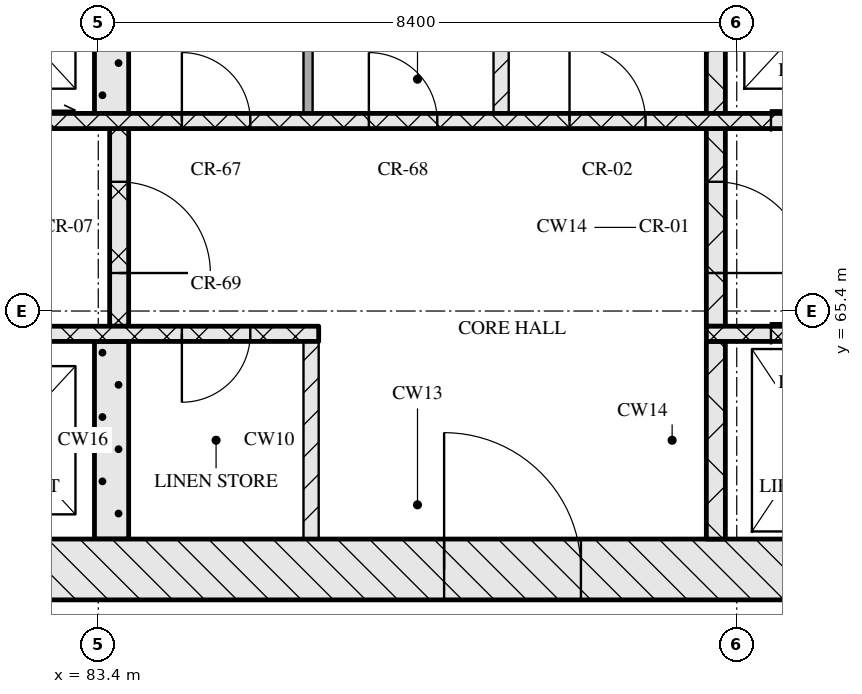
"""IFC4 building model, lengths in metres.
Left out: names, types, materials, properties, quantities, classifications, styles, units other than length and angle.
Written with IfcOpenShell. Run it as: python <this file> out.ifc"""

import sys

from ifc_helpers import new_model, si_unit, direction, frame, frame_2d, origin, place, context, subcontext, project, spatial, rectangle, extrude, element, fill, save


model = new_model("IFC4")
c1 = context("Model", 3, precision=1e-05, world=origin(), true_north=direction((0.0, 1.0)))
c2 = subcontext(c1, "Body", "Model", "MODEL_VIEW")
j1 = project(units=[si_unit("LENGTHUNIT", "METRE"), si_unit("PLANEANGLEUNIT", "RADIAN")], contexts=[c1])
p1 = place(None, origin())
s1 = spatial("IfcSite", under=j1, at=p1, CompositionType="ELEMENT")
p2 = place(p1, origin())
s2 = spatial("IfcBuilding", under=s1, at=p2, CompositionType="ELEMENT")
p3 = place(p2, frame((0.0, 0.0, 142.05)))
s3 = spatial("IfcBuildingStorey", under=s2, at=p3, CompositionType="ELEMENT", Elevation=142.05)
p4 = place(p3, frame((67.0, 62.0, 0.0), z_axis=(0.0, 0.0, 1.0), x_axis=(1.0, 0.0, 0.0)))
e1 = element("IfcWall", 1, at=p4, inside=s3, PredefinedType="SOLIDWALL", context=c2, shape_type="SweptSolid", body=[
    extrude(rectangle(XDim=41.2, YDim=0.8, at=frame_2d((20.6, 0.0))), origin(), (0.0, 0.0, 1.0), 5.12),
])
p5 = place(p4, frame((20.95, 0.0, 0.0)))
e2 = element("IfcOpeningElement", 2, at=p5, cuts=e1, PredefinedType="OPENING", context=c2, shape_type="SweptSolid", body=[
    extrude(rectangle(XDim=1.8, YDim=2.1, at=frame_2d((0.9, 1.05))), frame((0.0, 0.41, 0.0), z_axis=(0.0, -1.0, 0.0), x_axis=(1.0, 0.0, 0.0)), (0.0, 0.0, 1.0), 0.82),
])
p6 = place(p3, frame((83.575, 62.4, 0.0), z_axis=(0.0, 0.0, 1.0), x_axis=(0.0, 1.0, 0.0)))
e3 = element("IfcWall", 3, at=p6, inside=s3, PredefinedType="SOLIDWALL", context=c2, shape_type="SweptSolid", body=[
    extrude(rectangle(XDim=2.6, YDim=0.45, at=frame_2d((1.3, 0.0))), origin(), (0.0, 0.0, 1.0), 5.12),
])
p7 = place(p3, frame((86.2, 62.4, 0.0), z_axis=(0.0, 0.0, 1.0), x_axis=(0.0, 1.0, 0.0)))
e4 = element("IfcWall", 4, at=p7, inside=s3, PredefinedType="PARTITIONING", context=c2, shape_type="SweptSolid", body=[
    extrude(rectangle(XDim=2.6, YDim=0.2, at=frame_2d((1.3, 0.0))), origin(), (0.0, 0.0, 1.0), 5.12),
])
p8 = place(p3, frame((91.525, 62.4, 0.0), z_axis=(0.0, 0.0, 1.0), x_axis=(0.0, 1.0, 0.0)))
e5 = element("IfcWall", 5, at=p8, inside=s3, PredefinedType="SOLIDWALL", context=c2, shape_type="SweptSolid", body=[
    extrude(rectangle(XDim=2.6, YDim=0.25, at=frame_2d((1.3, 0.0))), origin(), (0.0, 0.0, 1.0), 5.12),
])
p9 = place(p3, frame((67.8, 65.1, 0.0), z_axis=(0.0, 0.0, 1.0), x_axis=(1.0, 0.0, 0.0)))
e6 = element("IfcWall", 6, at=p9, inside=s3, PredefinedType="SOLIDWALL", context=c2, shape_type="SweptSolid", body=[
    extrude(rectangle(XDim=18.5, YDim=0.2, at=frame_2d((9.25, 0.0))), origin(), (0.0, 0.0, 1.0), 5.12),
])
p10 = place(p9, frame((7.27, 0.0, 0.0)))
e7 = element("IfcOpeningElement", 7, at=p10, cuts=e6, PredefinedType="OPENING", context=c2, shape_type="SweptSolid", body=[
    extrude(rectangle(XDim=0.9, YDim=2.1, at=frame_2d((0.45, 1.05))), frame((0.0, 0.11, 0.0), z_axis=(0.0, -1.0, 0.0), x_axis=(1.0, 0.0, 0.0)), (0.0, 0.0, 1.0), 0.22),
])
p11 = place(p9, frame((8.85, 0.0, 0.0)))
e8 = element("IfcOpeningElement", 8, at=p11, cuts=e6, PredefinedType="OPENING", context=c2, shape_type="SweptSolid", body=[
    extrude(rectangle(XDim=1.1, YDim=2.1, at=frame_2d((0.55, 1.05))), frame((0.0, 0.11, 0.0), z_axis=(0.0, -1.0, 0.0), x_axis=(1.0, 0.0, 0.0)), (0.0, 0.0, 1.0), 0.22),
])
p12 = place(p9, frame((11.35, 0.0, 0.0)))
e9 = element("IfcOpeningElement", 9, at=p12, cuts=e6, PredefinedType="OPENING", context=c2, shape_type="SweptSolid", body=[
    extrude(rectangle(XDim=1.1, YDim=2.1, at=frame_2d((0.55, 1.05))), frame((0.0, 0.11, 0.0), z_axis=(0.0, -1.0, 0.0), x_axis=(1.0, 0.0, 0.0)), (0.0, 0.0, 1.0), 0.22),
])
p13 = place(p9, frame((13.85, 0.0, 0.0)))
e10 = element("IfcOpeningElement", 10, at=p13, cuts=e6, PredefinedType="OPENING", context=c2, shape_type="SweptSolid", body=[
    extrude(rectangle(XDim=1.1, YDim=2.1, at=frame_2d((0.55, 1.05))), frame((0.0, 0.11, 0.0), z_axis=(0.0, -1.0, 0.0), x_axis=(1.0, 0.0, 0.0)), (0.0, 0.0, 1.0), 0.22),
])
p14 = place(p9, frame((16.7, 0.0, 0.0)))
e11 = element("IfcOpeningElement", 11, at=p14, cuts=e6, PredefinedType="OPENING", context=c2, shape_type="SweptSolid", body=[
    extrude(rectangle(XDim=0.9, YDim=2.1, at=frame_2d((0.45, 1.05))), frame((0.0, 0.11, 0.0), z_axis=(0.0, -1.0, 0.0), x_axis=(1.0, 0.0, 0.0)), (0.0, 0.0, 1.0), 0.22),
])
p15 = place(p3, frame((91.4, 65.1, 0.0), z_axis=(0.0, 0.0, 1.0), x_axis=(1.0, 0.0, 0.0)))
e12 = element("IfcWall", 12, at=p15, inside=s3, PredefinedType="SOLIDWALL", context=c2, shape_type="SweptSolid", body=[
    extrude(rectangle(XDim=16.0, YDim=0.2, at=frame_2d((8.0, 0.0))), origin(), (0.0, 0.0, 1.0), 5.12),
])
p16 = place(p15, frame((0.85, 0.0, 0.0)))
e13 = element("IfcOpeningElement", 13, at=p16, cuts=e12, PredefinedType="OPENING", context=c2, shape_type="SweptSolid", body=[
    extrude(rectangle(XDim=1.1, YDim=2.1, at=frame_2d((0.55, 1.05))), frame((0.0, 0.11, 0.0), z_axis=(0.0, -1.0, 0.0), x_axis=(1.0, 0.0, 0.0)), (0.0, 0.0, 1.0), 0.22),
])
p17 = place(p15, frame((3.35, 0.0, 0.0)))
e14 = element("IfcOpeningElement", 14, at=p17, cuts=e12, PredefinedType="OPENING", context=c2, shape_type="SweptSolid", body=[
    extrude(rectangle(XDim=1.1, YDim=2.1, at=frame_2d((0.55, 1.05))), frame((0.0, 0.11, 0.0), z_axis=(0.0, -1.0, 0.0), x_axis=(1.0, 0.0, 0.0)), (0.0, 0.0, 1.0), 0.22),
])
p18 = place(p15, frame((5.85, 0.0, 0.0)))
e15 = element("IfcOpeningElement", 15, at=p18, cuts=e12, PredefinedType="OPENING", context=c2, shape_type="SweptSolid", body=[
    extrude(rectangle(XDim=1.1, YDim=2.1, at=frame_2d((0.55, 1.05))), frame((0.0, 0.11, 0.0), z_axis=(0.0, -1.0, 0.0), x_axis=(1.0, 0.0, 0.0)), (0.0, 0.0, 1.0), 0.22),
])
p19 = place(p15, frame((7.83, 0.0, 0.0)))
e16 = element("IfcOpeningElement", 16, at=p19, cuts=e12, PredefinedType="OPENING", context=c2, shape_type="SweptSolid", body=[
    extrude(rectangle(XDim=0.9, YDim=2.1, at=frame_2d((0.45, 1.05))), frame((0.0, 0.11, 0.0), z_axis=(0.0, -1.0, 0.0), x_axis=(1.0, 0.0, 0.0)), (0.0, 0.0, 1.0), 0.22),
])
p20 = place(p3, frame((83.675, 65.2, 0.0), z_axis=(0.0, 0.0, 1.0), x_axis=(0.0, 1.0, 0.0)))
e17 = element("IfcWall", 17, at=p20, inside=s3, PredefinedType="SOLIDWALL", context=c2, shape_type="SweptSolid", body=[
    extrude(rectangle(XDim=2.6, YDim=0.25, at=frame_2d((1.3, 0.0))), origin(), (0.0, 0.0, 1.0), 5.12),
])
p21 = place(p20, frame((0.7, 0.0, 0.0)))
e18 = element("IfcOpeningElement", 18, at=p21, cuts=e17, PredefinedType="OPENING", context=c2, shape_type="SweptSolid", body=[
    extrude(rectangle(XDim=1.2, YDim=2.1, at=frame_2d((0.6, 1.05))), frame((0.0, 0.135, 0.0), z_axis=(0.0, -1.0, 0.0), x_axis=(1.0, 0.0, 0.0)), (0.0, 0.0, 1.0), 0.27),
])
p22 = place(p3, frame((91.525, 65.2, 0.0), z_axis=(0.0, 0.0, 1.0), x_axis=(0.0, 1.0, 0.0)))
e19 = element("IfcWall", 19, at=p22, inside=s3, PredefinedType="SOLIDWALL", context=c2, shape_type="SweptSolid", body=[
    extrude(rectangle(XDim=2.6, YDim=0.25, at=frame_2d((1.3, 0.0))), origin(), (0.0, 0.0, 1.0), 5.12),
])
p23 = place(p22, frame((0.7, 0.0, 0.0)))
e20 = element("IfcOpeningElement", 20, at=p23, cuts=e19, PredefinedType="OPENING", context=c2, shape_type="SweptSolid", body=[
    extrude(rectangle(XDim=1.2, YDim=2.1, at=frame_2d((0.6, 1.05))), frame((0.0, 0.135, 0.0), z_axis=(0.0, -1.0, 0.0), x_axis=(1.0, 0.0, 0.0)), (0.0, 0.0, 1.0), 0.27),
])
p24 = place(p3, frame((76.05, 67.9, 0.0), z_axis=(0.0, 0.0, 1.0), x_axis=(1.0, 0.0, 0.0)))
e21 = element("IfcWall", 21, at=p24, inside=s3, PredefinedType="SOLIDWALL", context=c2, shape_type="SweptSolid", body=[
    extrude(rectangle(XDim=23.1, YDim=0.2, at=frame_2d((11.55, 0.0))), origin(), (0.0, 0.0, 1.0), 5.12),
])
p25 = place(p24, frame((0.6, 0.0, 0.0)))
e22 = element("IfcOpeningElement", 22, at=p25, cuts=e21, PredefinedType="OPENING", context=c2, shape_type="SweptSolid", body=[
    extrude(rectangle(XDim=1.1, YDim=2.1, at=frame_2d((0.55, 1.05))), frame((0.0, 0.11, 0.0), z_axis=(0.0, -1.0, 0.0), x_axis=(1.0, 0.0, 0.0)), (0.0, 0.0, 1.0), 0.22),
])
p26 = place(p24, frame((3.1, 0.0, 0.0)))
e23 = element("IfcOpeningElement", 23, at=p26, cuts=e21, PredefinedType="OPENING", context=c2, shape_type="SweptSolid", body=[
    extrude(rectangle(XDim=1.1, YDim=2.1, at=frame_2d((0.55, 1.05))), frame((0.0, 0.11, 0.0), z_axis=(0.0, -1.0, 0.0), x_axis=(1.0, 0.0, 0.0)), (0.0, 0.0, 1.0), 0.22),
])
p27 = place(p24, frame((5.6, 0.0, 0.0)))
e24 = element("IfcOpeningElement", 24, at=p27, cuts=e21, PredefinedType="OPENING", context=c2, shape_type="SweptSolid", body=[
    extrude(rectangle(XDim=1.1, YDim=2.1, at=frame_2d((0.55, 1.05))), frame((0.0, 0.11, 0.0), z_axis=(0.0, -1.0, 0.0), x_axis=(1.0, 0.0, 0.0)), (0.0, 0.0, 1.0), 0.22),
])
p28 = place(p24, frame((8.45, 0.0, 0.0)))
e25 = element("IfcOpeningElement", 25, at=p28, cuts=e21, PredefinedType="OPENING", context=c2, shape_type="SweptSolid", body=[
    extrude(rectangle(XDim=0.9, YDim=2.1, at=frame_2d((0.45, 1.05))), frame((0.0, 0.11, 0.0), z_axis=(0.0, -1.0, 0.0), x_axis=(1.0, 0.0, 0.0)), (0.0, 0.0, 1.0), 0.22),
])
p29 = place(p24, frame((10.91, 0.0, 0.0)))
e26 = element("IfcOpeningElement", 26, at=p29, cuts=e21, PredefinedType="OPENING", context=c2, shape_type="SweptSolid", body=[
    extrude(rectangle(XDim=0.9, YDim=2.1, at=frame_2d((0.45, 1.05))), frame((0.0, 0.11, 0.0), z_axis=(0.0, -1.0, 0.0), x_axis=(1.0, 0.0, 0.0)), (0.0, 0.0, 1.0), 0.22),
])
p30 = place(p24, frame((13.55, 0.0, 0.0)))
e27 = element("IfcOpeningElement", 27, at=p30, cuts=e21, PredefinedType="OPENING", context=c2, shape_type="SweptSolid", body=[
    extrude(rectangle(XDim=1.0, YDim=2.1, at=frame_2d((0.5, 1.05))), frame((0.0, 0.11, 0.0), z_axis=(0.0, -1.0, 0.0), x_axis=(1.0, 0.0, 0.0)), (0.0, 0.0, 1.0), 0.22),
])
p31 = place(p24, frame((16.2, 0.0, 0.0)))
e28 = element("IfcOpeningElement", 28, at=p31, cuts=e21, PredefinedType="OPENING", context=c2, shape_type="SweptSolid", body=[
    extrude(rectangle(XDim=1.1, YDim=2.1, at=frame_2d((0.55, 1.05))), frame((0.0, 0.11, 0.0), z_axis=(0.0, -1.0, 0.0), x_axis=(1.0, 0.0, 0.0)), (0.0, 0.0, 1.0), 0.22),
])
p32 = place(p24, frame((18.7, 0.0, 0.0)))
e29 = element("IfcOpeningElement", 29, at=p32, cuts=e21, PredefinedType="OPENING", context=c2, shape_type="SweptSolid", body=[
    extrude(rectangle(XDim=1.1, YDim=2.1, at=frame_2d((0.55, 1.05))), frame((0.0, 0.11, 0.0), z_axis=(0.0, -1.0, 0.0), x_axis=(1.0, 0.0, 0.0)), (0.0, 0.0, 1.0), 0.22),
])
p33 = place(p24, frame((21.2, 0.0, 0.0)))
e30 = element("IfcOpeningElement", 30, at=p33, cuts=e21, PredefinedType="OPENING", context=c2, shape_type="SweptSolid", body=[
    extrude(rectangle(XDim=1.1, YDim=2.1, at=frame_2d((0.55, 1.05))), frame((0.0, 0.11, 0.0), z_axis=(0.0, -1.0, 0.0), x_axis=(1.0, 0.0, 0.0)), (0.0, 0.0, 1.0), 0.22),
])
p34 = place(p3, frame((83.575, 68.0, 0.0), z_axis=(0.0, 0.0, 1.0), x_axis=(0.0, 1.0, 0.0)))
e31 = element("IfcWall", 31, at=p34, inside=s3, PredefinedType="SOLIDWALL", context=c2, shape_type="SweptSolid", body=[
    extrude(rectangle(XDim=2.6, YDim=0.45, at=frame_2d((1.3, 0.0))), origin(), (0.0, 0.0, 1.0), 5.12),
])
p35 = place(p3, frame((86.16, 68.0, 0.0), z_axis=(0.0, 0.0, 1.0), x_axis=(0.0, 1.0, 0.0)))
e32 = element("IfcWall", 32, at=p35, inside=s3, PredefinedType="PARTITIONING", context=c2, shape_type="SweptSolid", body=[
    extrude(rectangle(XDim=2.6, YDim=0.12, at=frame_2d((1.3, 0.0))), origin(), (0.0, 0.0, 1.0), 5.12),
])
p36 = place(p3, frame((88.7, 68.0, 0.0), z_axis=(0.0, 0.0, 1.0), x_axis=(0.0, 1.0, 0.0)))
e33 = element("IfcWall", 33, at=p36, inside=s3, PredefinedType="PARTITIONING", context=c2, shape_type="SweptSolid", body=[
    extrude(rectangle(XDim=2.6, YDim=0.2, at=frame_2d((1.3, 0.0))), origin(), (0.0, 0.0, 1.0), 5.12),
])
p37 = place(p3, frame((91.525, 68.0, 0.0), z_axis=(0.0, 0.0, 1.0), x_axis=(0.0, 1.0, 0.0)))
e34 = element("IfcWall", 34, at=p37, inside=s3, PredefinedType="SOLIDWALL", context=c2, shape_type="SweptSolid", body=[
    extrude(rectangle(XDim=2.6, YDim=0.25, at=frame_2d((1.3, 0.0))), origin(), (0.0, 0.0, 1.0), 5.12),
])
p38 = place(p5, origin())
e35 = element("IfcDoor", 35, at=p38, inside=s3, OperationType="DOUBLE_DOOR_SINGLE_SWING", PredefinedType="DOOR", context=c2, shape_type="SweptSolid", body=[
    extrude(rectangle(XDim=1.8, YDim=2.1, at=frame_2d((0.9, 1.05))), frame((0.0, 0.025, 0.0), z_axis=(0.0, -1.0, 0.0), x_axis=(1.0, 0.0, 0.0)), (0.0, 0.0, 1.0), 0.05),
])
fill(e2, e35)
p39 = place(p14, origin())
e36 = element("IfcDoor", 36, at=p39, inside=s3, OperationType="SINGLE_SWING_RIGHT", PredefinedType="DOOR", context=c2, shape_type="SweptSolid", body=[
    extrude(rectangle(XDim=0.9, YDim=2.1, at=frame_2d((0.45, 1.05))), frame((0.0, 0.025, 0.0), z_axis=(0.0, -1.0, 0.0), x_axis=(1.0, 0.0, 0.0)), (0.0, 0.0, 1.0), 0.05),
])
fill(e11, e36)
p40 = place(p16, origin())
e37 = element("IfcDoor", 37, at=p40, inside=s3, OperationType="SLIDING_TO_LEFT", PredefinedType="DOOR", context=c2, shape_type="SweptSolid", body=[
    extrude(rectangle(XDim=1.1, YDim=2.1, at=frame_2d((0.55, 1.05))), frame((0.0, 0.025, 0.0), z_axis=(0.0, -1.0, 0.0), x_axis=(1.0, 0.0, 0.0)), (0.0, 0.0, 1.0), 0.05),
])
fill(e13, e37)
p41 = place(p21, origin())
e38 = element("IfcDoor", 38, at=p41, inside=s3, OperationType="SINGLE_SWING_RIGHT", PredefinedType="DOOR", context=c2, shape_type="SweptSolid", body=[
    extrude(rectangle(XDim=1.2, YDim=2.1, at=frame_2d((0.6, 1.05))), frame((0.0, 0.025, 0.0), z_axis=(0.0, -1.0, 0.0), x_axis=(1.0, 0.0, 0.0)), (0.0, 0.0, 1.0), 0.05),
])
fill(e18, e38)
p42 = place(p23, origin())
e39 = element("IfcDoor", 39, at=p42, inside=s3, OperationType="SINGLE_SWING_RIGHT", PredefinedType="DOOR", context=c2, shape_type="SweptSolid", body=[
    extrude(rectangle(XDim=1.2, YDim=2.1, at=frame_2d((0.6, 1.05))), frame((0.0, 0.025, 0.0), z_axis=(0.0, -1.0, 0.0), x_axis=(1.0, 0.0, 0.0)), (0.0, 0.0, 1.0), 0.05),
])
fill(e20, e39)
p43 = place(p28, origin())
e40 = element("IfcDoor", 40, at=p43, inside=s3, OperationType="SINGLE_SWING_LEFT", PredefinedType="DOOR", context=c2, shape_type="SweptSolid", body=[
    extrude(rectangle(XDim=0.9, YDim=2.1, at=frame_2d((0.45, 1.05))), frame((0.0, 0.025, 0.0), z_axis=(0.0, -1.0, 0.0), x_axis=(1.0, 0.0, 0.0)), (0.0, 0.0, 1.0), 0.05),
])
fill(e25, e40)
p44 = place(p29, origin())
e41 = element("IfcDoor", 41, at=p44, inside=s3, OperationType="SINGLE_SWING_LEFT", PredefinedType="DOOR", context=c2, shape_type="SweptSolid", body=[
    extrude(rectangle(XDim=0.9, YDim=2.1, at=frame_2d((0.45, 1.05))), frame((0.0, 0.025, 0.0), z_axis=(0.0, -1.0, 0.0), x_axis=(1.0, 0.0, 0.0)), (0.0, 0.0, 1.0), 0.05),
])
fill(e26, e41)
p45 = place(p30, origin())
e42 = element("IfcDoor", 42, at=p45, inside=s3, OperationType="SINGLE_SWING_LEFT", PredefinedType="DOOR", context=c2, shape_type="SweptSolid", body=[
    extrude(rectangle(XDim=1.0, YDim=2.1, at=frame_2d((0.5, 1.05))), frame((0.0, 0.025, 0.0), z_axis=(0.0, -1.0, 0.0), x_axis=(1.0, 0.0, 0.0)), (0.0, 0.0, 1.0), 0.05),
])
fill(e27, e42)
p46 = place(p31, origin())
e43 = element("IfcDoor", 43, at=p46, inside=s3, OperationType="SLIDING_TO_RIGHT", PredefinedType="DOOR", context=c2, shape_type="SweptSolid", body=[
    extrude(rectangle(XDim=1.1, YDim=2.1, at=frame_2d((0.55, 1.05))), frame((0.0, 0.025, 0.0), z_axis=(0.0, -1.0, 0.0), x_axis=(1.0, 0.0, 0.0)), (0.0, 0.0, 1.0), 0.05),
])
fill(e28, e43)
save(model, sys.argv[1])
